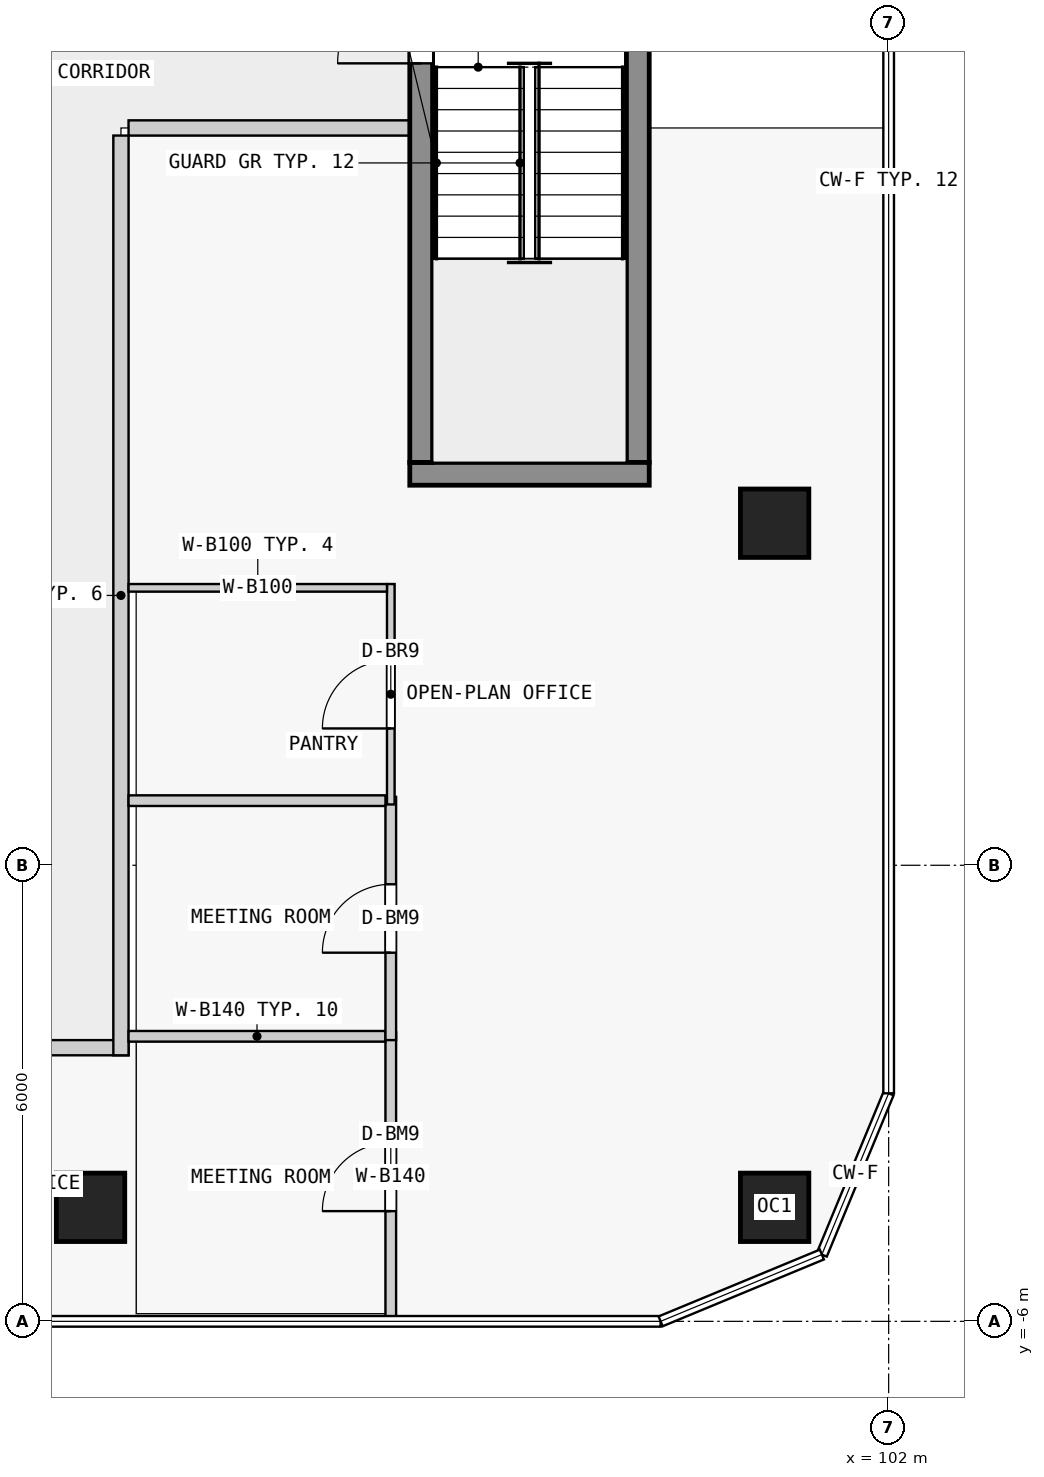
"""IFC4 building model, lengths in metres.
Left out: names, types, materials, properties, quantities, classifications, styles, units other than length and angle.
Written with IfcOpenShell. Run it as: python <this file> out.ifc"""

import sys

from ifc_helpers import new_model, si_unit, direction, frame, frame_2d, origin, origin_2d, place, context, subcontext, project, spatial, rectangle, extrude, element, fill, save


model = new_model("IFC4")
c1 = context("Model", 3, precision=1e-05, world=origin(), true_north=direction((0.0, 1.0)))
c2 = subcontext(c1, "Body", "Model", "MODEL_VIEW")
j1 = project(units=[si_unit("LENGTHUNIT", "METRE"), si_unit("PLANEANGLEUNIT", "RADIAN")], contexts=[c1])
p1 = place(None, origin())
s1 = spatial("IfcSite", under=j1, at=p1, CompositionType="ELEMENT")
p2 = place(p1, origin())
s2 = spatial("IfcBuilding", under=s1, at=p2, CompositionType="ELEMENT")
p3 = place(p2, frame((0.0, 0.0, 33.8)))
s3 = spatial("IfcBuildingStorey", under=s2, at=p3, CompositionType="ELEMENT", Elevation=33.8)
for number, where, z_axis, x_axis in (
    (1, (91.5, -4.5, 0.0), (0.0, 0.0, 1.0), (1.0, 0.0, 0.0)),
    (2, (100.5, -4.5, 0.0), (0.0, 0.0, 1.0), (1.0, 0.0, 0.0)),
    (3, (100.5, 4.5, 0.0), (0.0, 0.0, 1.0), (1.0, 0.0, 0.0)),
):
    element("IfcColumn", number, at=place(p3, frame(where, z_axis=z_axis, x_axis=x_axis)), inside=s3, PredefinedType="COLUMN", context=c2, shape_type="SweptSolid", body=[
        extrude(rectangle(XDim=0.9, YDim=0.9, at=origin_2d()), origin(), (0.0, 0.0, 1.0), 3.5),
    ])
p4 = place(p3, frame((95.85, 5.3, 0.0), z_axis=(0.0, 0.0, 1.0), x_axis=(0.0, 1.0, 0.0)))
e4 = element("IfcWall", 4, at=p4, inside=s3, PredefinedType="SHEAR", context=c2, shape_type="SweptSolid", body=[
    extrude(rectangle(XDim=6.4, YDim=0.3, at=frame_2d((3.2, 0.0))), origin(), (0.0, 0.0, 1.0), 3.25),
])
p5 = place(p4, frame((5.25, 0.0, 0.0)))
e5 = element("IfcOpeningElement", 5, at=p5, cuts=e4, PredefinedType="OPENING", context=c2, shape_type="SweptSolid", body=[
    extrude(rectangle(XDim=1.1, YDim=2.1, at=frame_2d((0.55, 1.05))), frame((0.0, 0.16, 0.0), z_axis=(0.0, -1.0, 0.0), x_axis=(1.0, 0.0, 0.0)), (0.0, 0.0, 1.0), 0.32),
])
p6 = place(p3, frame((98.7, 5.3, 0.0), z_axis=(0.0, 0.0, 1.0), x_axis=(0.0, 1.0, 0.0)))
e6 = element("IfcWall", 6, at=p6, inside=s3, PredefinedType="SHEAR", context=c2, shape_type="SweptSolid", body=[
    extrude(rectangle(XDim=6.4, YDim=0.3, at=frame_2d((3.2, 0.0))), origin(), (0.0, 0.0, 1.0), 3.25),
])
p7 = place(p3, frame((95.7, 5.15, 0.0), z_axis=(0.0, 0.0, 1.0), x_axis=(1.0, 0.0, 0.0)))
e7 = element("IfcWall", 7, at=p7, inside=s3, PredefinedType="SHEAR", context=c2, shape_type="SweptSolid", body=[
    extrude(rectangle(XDim=3.15, YDim=0.3, at=frame_2d((1.575, 0.0))), origin(), (0.0, 0.0, 1.0), 3.25),
])
p8 = place(p3, frame((72.0, -2.4, 0.0), z_axis=(0.0, 0.0, 1.0), x_axis=(1.0, 0.0, 0.0)))
e8 = element("IfcWall", 8, at=p8, inside=s3, PredefinedType="PARTITIONING", context=c2, shape_type="SweptSolid", body=[
    extrude(rectangle(XDim=20.0, YDim=0.2, at=frame_2d((10.0, 0.0))), origin(), (0.0, 0.0, 1.0), 3.25),
])
p9 = place(p8, frame((11.1, 0.0, 0.0)))
e9 = element("IfcOpeningElement", 9, at=p9, cuts=e8, PredefinedType="OPENING", context=c2, shape_type="SweptSolid", body=[
    extrude(rectangle(XDim=1.8, YDim=2.1, at=frame_2d((0.9, 1.05))), frame((0.0, 0.11, 0.0), z_axis=(0.0, -1.0, 0.0), x_axis=(1.0, 0.0, 0.0)), (0.0, 0.0, 1.0), 0.22),
])
p10 = place(p3, frame((91.9, -2.5, 0.0), z_axis=(0.0, 0.0, 1.0), x_axis=(0.0, 1.0, 0.0)))
e10 = element("IfcWall", 10, at=p10, inside=s3, PredefinedType="PARTITIONING", context=c2, shape_type="SweptSolid", body=[
    extrude(rectangle(XDim=12.1, YDim=0.2, at=frame_2d((6.05, 0.0))), origin(), (0.0, 0.0, 1.0), 3.25),
])
p11 = place(p3, frame((92.0, 9.7, 0.0), z_axis=(0.0, 0.0, 1.0), x_axis=(1.0, 0.0, 0.0)))
e11 = element("IfcWall", 11, at=p11, inside=s3, PredefinedType="PARTITIONING", context=c2, shape_type="SweptSolid", body=[
    extrude(rectangle(XDim=3.7, YDim=0.2, at=frame_2d((1.85, 0.0))), origin(), (0.0, 0.0, 1.0), 3.25),
])
p12 = place(p3, frame((95.45, -6.0, 0.0), z_axis=(0.0, 0.0, 1.0), x_axis=(0.0, 1.0, 0.0)))
e12 = element("IfcWall", 12, at=p12, inside=s3, PredefinedType="PARTITIONING", context=c2, shape_type="SweptSolid", body=[
    extrude(rectangle(XDim=3.8, YDim=0.14, at=frame_2d((1.9, 0.0))), origin(), (0.0, 0.0, 1.0), 3.25),
])
p13 = place(p12, frame((1.45, 0.0, 0.0)))
e13 = element("IfcOpeningElement", 13, at=p13, cuts=e12, PredefinedType="OPENING", context=c2, shape_type="SweptSolid", body=[
    extrude(rectangle(XDim=0.9, YDim=2.4, at=frame_2d((0.45, 1.2))), frame((0.0, 0.08, 0.0), z_axis=(0.0, -1.0, 0.0), x_axis=(1.0, 0.0, 0.0)), (0.0, 0.0, 1.0), 0.16),
])
p14 = place(p3, frame((92.0, -2.25, 0.0), z_axis=(0.0, 0.0, 1.0), x_axis=(1.0, 0.0, 0.0)))
e14 = element("IfcWall", 14, at=p14, inside=s3, PredefinedType="PARTITIONING", context=c2, shape_type="SweptSolid", body=[
    extrude(rectangle(XDim=3.38, YDim=0.14, at=frame_2d((1.69, 0.0))), origin(), (0.0, 0.0, 1.0), 3.25),
])
p15 = place(p3, frame((95.45, -2.3, 0.0), z_axis=(0.0, 0.0, 1.0), x_axis=(0.0, 1.0, 0.0)))
e15 = element("IfcWall", 15, at=p15, inside=s3, PredefinedType="PARTITIONING", context=c2, shape_type="SweptSolid", body=[
    extrude(rectangle(XDim=3.2, YDim=0.14, at=frame_2d((1.6, 0.0))), origin(), (0.0, 0.0, 1.0), 3.25),
])
p16 = place(p15, frame((1.15, 0.0, 0.0)))
e16 = element("IfcOpeningElement", 16, at=p16, cuts=e15, PredefinedType="OPENING", context=c2, shape_type="SweptSolid", body=[
    extrude(rectangle(XDim=0.9, YDim=2.4, at=frame_2d((0.45, 1.2))), frame((0.0, 0.08, 0.0), z_axis=(0.0, -1.0, 0.0), x_axis=(1.0, 0.0, 0.0)), (0.0, 0.0, 1.0), 0.16),
])
p17 = place(p3, frame((92.0, 0.85, 0.0), z_axis=(0.0, 0.0, 1.0), x_axis=(1.0, 0.0, 0.0)))
e17 = element("IfcWall", 17, at=p17, inside=s3, PredefinedType="PARTITIONING", context=c2, shape_type="SweptSolid", body=[
    extrude(rectangle(XDim=3.38, YDim=0.14, at=frame_2d((1.69, 0.0))), origin(), (0.0, 0.0, 1.0), 3.25),
])
p18 = place(p3, frame((95.45, 0.8, 0.0), z_axis=(0.0, 0.0, 1.0), x_axis=(0.0, 1.0, 0.0)))
e18 = element("IfcWall", 18, at=p18, inside=s3, PredefinedType="PARTITIONING", context=c2, shape_type="SweptSolid", body=[
    extrude(rectangle(XDim=2.9, YDim=0.1, at=frame_2d((1.45, 0.0))), origin(), (0.0, 0.0, 1.0), 3.25),
])
p19 = place(p18, frame((1.0, 0.0, 0.0)))
e19 = element("IfcOpeningElement", 19, at=p19, cuts=e18, PredefinedType="OPENING", context=c2, shape_type="SweptSolid", body=[
    extrude(rectangle(XDim=0.9, YDim=2.1, at=frame_2d((0.45, 1.05))), frame((0.0, 0.06, 0.0), z_axis=(0.0, -1.0, 0.0), x_axis=(1.0, 0.0, 0.0)), (0.0, 0.0, 1.0), 0.12),
])
p20 = place(p3, frame((92.0, 3.65, 0.0), z_axis=(0.0, 0.0, 1.0), x_axis=(1.0, 0.0, 0.0)))
e20 = element("IfcWall", 20, at=p20, inside=s3, PredefinedType="PARTITIONING", context=c2, shape_type="SweptSolid", body=[
    extrude(rectangle(XDim=3.4, YDim=0.1, at=frame_2d((1.7, 0.0))), origin(), (0.0, 0.0, 1.0), 3.25),
])
p21 = place(p5, origin())
e21 = element("IfcDoor", 21, at=p21, inside=s3, OperationType="SINGLE_SWING_LEFT", PredefinedType="DOOR", context=c2, shape_type="SweptSolid", body=[
    extrude(rectangle(XDim=1.1, YDim=2.1, at=frame_2d((0.55, 1.05))), frame((0.0, 0.025, 0.0), z_axis=(0.0, -1.0, 0.0), x_axis=(1.0, 0.0, 0.0)), (0.0, 0.0, 1.0), 0.05),
])
fill(e5, e21)
p22 = place(p13, origin())
e22 = element("IfcDoor", 22, at=p22, inside=s3, OperationType="SINGLE_SWING_LEFT", PredefinedType="DOOR", context=c2, shape_type="SweptSolid", body=[
    extrude(rectangle(XDim=0.9, YDim=2.4, at=frame_2d((0.45, 1.2))), frame((0.0, 0.025, 0.0), z_axis=(0.0, -1.0, 0.0), x_axis=(1.0, 0.0, 0.0)), (0.0, 0.0, 1.0), 0.05),
])
fill(e13, e22)
p23 = place(p16, origin())
e23 = element("IfcDoor", 23, at=p23, inside=s3, OperationType="SINGLE_SWING_LEFT", PredefinedType="DOOR", context=c2, shape_type="SweptSolid", body=[
    extrude(rectangle(XDim=0.9, YDim=2.4, at=frame_2d((0.45, 1.2))), frame((0.0, 0.025, 0.0), z_axis=(0.0, -1.0, 0.0), x_axis=(1.0, 0.0, 0.0)), (0.0, 0.0, 1.0), 0.05),
])
fill(e16, e23)
p24 = place(p19, origin())
e24 = element("IfcDoor", 24, at=p24, inside=s3, OperationType="SINGLE_SWING_LEFT", PredefinedType="DOOR", context=c2, shape_type="SweptSolid", body=[
    extrude(rectangle(XDim=0.9, YDim=2.1, at=frame_2d((0.45, 1.05))), frame((0.0, 0.025, 0.0), z_axis=(0.0, -1.0, 0.0), x_axis=(1.0, 0.0, 0.0)), (0.0, 0.0, 1.0), 0.05),
])
fill(e19, e24)
save(model, sys.argv[1])
